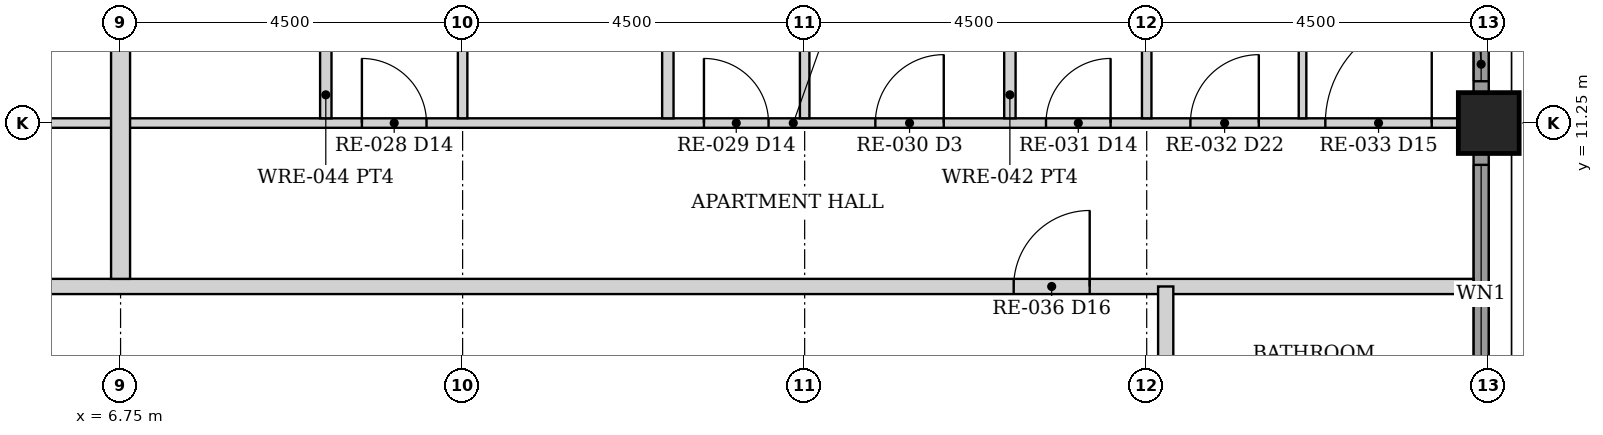
"""IFC4 building model, lengths in metres.
Left out: names, types, materials, properties, quantities, classifications, styles, units other than length and angle.
Written with IfcOpenShell. Run it as: python <this file> out.ifc"""

import sys

from ifc_helpers import new_model, si_unit, direction, frame, frame_2d, origin, origin_2d, place, context, subcontext, project, spatial, rectangle, hollow_rectangle, extrude, element, fill, save


model = new_model("IFC4")
c1 = context("Model", 3, precision=1e-05, world=origin(), true_north=direction((0.0, 1.0)))
c2 = subcontext(c1, "Body", "Model", "MODEL_VIEW")
j1 = project(units=[si_unit("LENGTHUNIT", "METRE"), si_unit("PLANEANGLEUNIT", "RADIAN")], contexts=[c1])
p1 = place(None, origin())
s1 = spatial("IfcSite", under=j1, at=p1, CompositionType="ELEMENT")
p2 = place(p1, origin())
s2 = spatial("IfcBuilding", under=s1, at=p2, CompositionType="ELEMENT")
p3 = place(p2, frame((0.0, 0.0, 68.5)))
s3 = spatial("IfcBuildingStorey", under=s2, at=p3, CompositionType="ELEMENT", Elevation=68.5)
p4 = place(p3, frame((24.75, 11.25, 0.0), z_axis=(0.0, 0.0, 1.0), x_axis=(1.0, 0.0, 0.0)))
e1 = element("IfcColumn", 1, at=p4, inside=s3, PredefinedType="COLUMN", context=c2, shape_type="SweptSolid", body=[
    extrude(hollow_rectangle(XDim=0.8, YDim=0.8, WallThickness=0.06, at=origin_2d()), origin(), (0.0, 0.0, 1.0), 3.5),
])
p5 = place(p3, frame((24.65, 7.155, 0.0), z_axis=(0.0, 0.0, 1.0), x_axis=(0.0, 1.0, 0.0)))
e2 = element("IfcWall", 2, at=p5, inside=s3, PredefinedType="SOLIDWALL", context=c2, shape_type="SweptSolid", body=[
    extrude(rectangle(XDim=3.69, YDim=0.2, at=frame_2d((1.845, 0.0))), origin(), (0.0, 0.0, 1.0), 2.379),
])
p6 = place(p5, frame((0.145, 0.0, 0.3)))
e3 = element("IfcOpeningElement", 3, at=p6, cuts=e2, PredefinedType="OPENING", context=c2, shape_type="SweptSolid", body=[
    extrude(rectangle(XDim=3.4, YDim=1.929, at=frame_2d((1.7, 0.964))), frame((0.0, 0.11, 0.0), z_axis=(0.0, -1.0, 0.0), x_axis=(1.0, 0.0, 0.0)), (0.0, 0.0, 1.0), 0.22),
])
p7 = place(p3, frame((24.65, 11.655, 0.0), z_axis=(0.0, 0.0, 1.0), x_axis=(0.0, 1.0, 0.0)))
e4 = element("IfcWall", 4, at=p7, inside=s3, PredefinedType="SOLIDWALL", context=c2, shape_type="SweptSolid", body=[
    extrude(rectangle(XDim=3.69, YDim=0.2, at=frame_2d((1.845, 0.0))), origin(), (0.0, 0.0, 1.0), 2.379),
])
p8 = place(p7, frame((0.145, 0.0, 0.3)))
e5 = element("IfcOpeningElement", 5, at=p8, cuts=e4, PredefinedType="OPENING", context=c2, shape_type="SweptSolid", body=[
    extrude(rectangle(XDim=3.4, YDim=1.929, at=frame_2d((1.7, 0.964))), frame((0.0, 0.11, 0.0), z_axis=(0.0, -1.0, 0.0), x_axis=(1.0, 0.0, 0.0)), (0.0, 0.0, 1.0), 0.22),
])
p9 = place(p3, frame((-24.55, 9.1, 0.0), z_axis=(0.0, 0.0, 1.0), x_axis=(1.0, 0.0, 0.0)))
e6 = element("IfcWall", 6, at=p9, inside=s3, PredefinedType="PARTITIONING", context=c2, shape_type="SweptSolid", body=[
    extrude(rectangle(XDim=49.1, YDim=0.2, at=frame_2d((24.55, 0.0))), origin(), (0.0, 0.0, 1.0), 2.373),
])
p10 = place(p9, frame((5.05, 0.0, 0.0)))
e7 = element("IfcOpeningElement", 7, at=p10, cuts=e6, PredefinedType="OPENING", context=c2, shape_type="SweptSolid", body=[
    extrude(rectangle(XDim=1.0, YDim=2.3, at=frame_2d((0.5, 1.15))), frame((0.0, 0.11, 0.0), z_axis=(0.0, -1.0, 0.0), x_axis=(1.0, 0.0, 0.0)), (0.0, 0.0, 1.0), 0.22),
])
p11 = place(p9, frame((18.05, 0.0, 0.0)))
e8 = element("IfcOpeningElement", 8, at=p11, cuts=e6, PredefinedType="OPENING", context=c2, shape_type="SweptSolid", body=[
    extrude(rectangle(XDim=1.0, YDim=2.3, at=frame_2d((0.5, 1.15))), frame((0.0, 0.11, 0.0), z_axis=(0.0, -1.0, 0.0), x_axis=(1.0, 0.0, 0.0)), (0.0, 0.0, 1.0), 0.22),
])
p12 = place(p9, frame((43.05, 0.0, 0.0)))
e9 = element("IfcOpeningElement", 9, at=p12, cuts=e6, PredefinedType="OPENING", context=c2, shape_type="SweptSolid", body=[
    extrude(rectangle(XDim=1.0, YDim=2.3, at=frame_2d((0.5, 1.15))), frame((0.0, 0.11, 0.0), z_axis=(0.0, -1.0, 0.0), x_axis=(1.0, 0.0, 0.0)), (0.0, 0.0, 1.0), 0.22),
])
p13 = place(p3, frame((20.5, -9.1, 0.0), z_axis=(0.0, 0.0, 1.0), x_axis=(0.0, 1.0, 0.0)))
e10 = element("IfcWall", 10, at=p13, inside=s3, PredefinedType="PARTITIONING", context=c2, shape_type="SweptSolid", body=[
    extrude(rectangle(XDim=18.2, YDim=0.2, at=frame_2d((9.1, 0.0))), origin(), (0.0, 0.0, 1.0), 2.373),
])
p14 = place(p13, frame((6.35, 0.0, 0.0)))
e11 = element("IfcOpeningElement", 11, at=p14, cuts=e10, PredefinedType="OPENING", context=c2, shape_type="SweptSolid", body=[
    extrude(rectangle(XDim=1.0, YDim=2.3, at=frame_2d((0.5, 1.15))), frame((0.0, 0.11, 0.0), z_axis=(0.0, -1.0, 0.0), x_axis=(1.0, 0.0, 0.0)), (0.0, 0.0, 1.0), 0.22),
])
p15 = place(p3, frame((-6.65, 11.25, 0.0), z_axis=(0.0, 0.0, 1.0), x_axis=(1.0, 0.0, 0.0)))
e12 = element("IfcWall", 12, at=p15, inside=s3, PredefinedType="PARTITIONING", context=c2, shape_type="SweptSolid", body=[
    extrude(rectangle(XDim=13.3, YDim=0.125, at=frame_2d((6.65, 0.0))), origin(), (0.0, 0.0, 1.0), 2.373),
])
p16 = place(p15, frame((0.7, 0.0, 0.0)))
e13 = element("IfcOpeningElement", 13, at=p16, cuts=e12, PredefinedType="OPENING", context=c2, shape_type="SweptSolid", body=[
    extrude(rectangle(XDim=0.9, YDim=2.1, at=frame_2d((0.45, 1.05))), frame((0.0, 0.073, 0.0), z_axis=(0.0, -1.0, 0.0), x_axis=(1.0, 0.0, 0.0)), (0.0, 0.0, 1.0), 0.145),
])
p17 = place(p15, frame((2.7, 0.0, 0.0)))
e14 = element("IfcOpeningElement", 14, at=p17, cuts=e12, PredefinedType="OPENING", context=c2, shape_type="SweptSolid", body=[
    extrude(rectangle(XDim=1.4, YDim=2.1, at=frame_2d((0.7, 1.05))), frame((0.0, 0.073, 0.0), z_axis=(0.0, -1.0, 0.0), x_axis=(1.0, 0.0, 0.0)), (0.0, 0.0, 1.0), 0.145),
])
p18 = place(p15, frame((4.875, 0.0, 0.0)))
e15 = element("IfcOpeningElement", 15, at=p18, cuts=e12, PredefinedType="OPENING", context=c2, shape_type="SweptSolid", body=[
    extrude(rectangle(XDim=0.85, YDim=2.1, at=frame_2d((0.425, 1.05))), frame((0.0, 0.073, 0.0), z_axis=(0.0, -1.0, 0.0), x_axis=(1.0, 0.0, 0.0)), (0.0, 0.0, 1.0), 0.145),
])
p19 = place(p15, frame((7.07, 0.0, 0.0)))
e16 = element("IfcOpeningElement", 16, at=p19, cuts=e12, PredefinedType="OPENING", context=c2, shape_type="SweptSolid", body=[
    extrude(rectangle(XDim=0.9, YDim=2.1, at=frame_2d((0.45, 1.05))), frame((0.0, 0.073, 0.0), z_axis=(0.0, -1.0, 0.0), x_axis=(1.0, 0.0, 0.0)), (0.0, 0.0, 1.0), 0.145),
])
p20 = place(p15, frame((9.375, 0.0, 0.0)))
e17 = element("IfcOpeningElement", 17, at=p20, cuts=e12, PredefinedType="OPENING", context=c2, shape_type="SweptSolid", body=[
    extrude(rectangle(XDim=0.85, YDim=2.1, at=frame_2d((0.425, 1.05))), frame((0.0, 0.073, 0.0), z_axis=(0.0, -1.0, 0.0), x_axis=(1.0, 0.0, 0.0)), (0.0, 0.0, 1.0), 0.145),
])
p21 = place(p3, frame((6.85, 11.25, 0.0), z_axis=(0.0, 0.0, 1.0), x_axis=(1.0, 0.0, 0.0)))
e18 = element("IfcWall", 18, at=p21, inside=s3, PredefinedType="PARTITIONING", context=c2, shape_type="SweptSolid", body=[
    extrude(rectangle(XDim=17.5, YDim=0.125, at=frame_2d((8.75, 0.0))), origin(), (0.0, 0.0, 1.0), 2.373),
])
p22 = place(p21, frame((13.975, 0.0, 0.0)))
e19 = element("IfcOpeningElement", 19, at=p22, cuts=e18, PredefinedType="OPENING", context=c2, shape_type="SweptSolid", body=[
    extrude(rectangle(XDim=0.9, YDim=2.1, at=frame_2d((0.45, 1.05))), frame((0.0, 0.073, 0.0), z_axis=(0.0, -1.0, 0.0), x_axis=(1.0, 0.0, 0.0)), (0.0, 0.0, 1.0), 0.145),
])
p23 = place(p21, frame((15.75, 0.0, 0.0)))
e20 = element("IfcOpeningElement", 20, at=p23, cuts=e18, PredefinedType="OPENING", context=c2, shape_type="SweptSolid", body=[
    extrude(rectangle(XDim=1.4, YDim=2.1, at=frame_2d((0.7, 1.05))), frame((0.0, 0.073, 0.0), z_axis=(0.0, -1.0, 0.0), x_axis=(1.0, 0.0, 0.0)), (0.0, 0.0, 1.0), 0.145),
])
p24 = place(p21, frame((12.075, 0.0, 0.0)))
e21 = element("IfcOpeningElement", 21, at=p24, cuts=e18, PredefinedType="OPENING", context=c2, shape_type="SweptSolid", body=[
    extrude(rectangle(XDim=0.85, YDim=2.1, at=frame_2d((0.425, 1.05))), frame((0.0, 0.073, 0.0), z_axis=(0.0, -1.0, 0.0), x_axis=(1.0, 0.0, 0.0)), (0.0, 0.0, 1.0), 0.145),
])
p25 = place(p21, frame((9.83, 0.0, 0.0)))
e22 = element("IfcOpeningElement", 22, at=p25, cuts=e18, PredefinedType="OPENING", context=c2, shape_type="SweptSolid", body=[
    extrude(rectangle(XDim=0.9, YDim=2.1, at=frame_2d((0.45, 1.05))), frame((0.0, 0.073, 0.0), z_axis=(0.0, -1.0, 0.0), x_axis=(1.0, 0.0, 0.0)), (0.0, 0.0, 1.0), 0.145),
])
p26 = place(p21, frame((7.575, 0.0, 0.0)))
e23 = element("IfcOpeningElement", 23, at=p26, cuts=e18, PredefinedType="OPENING", context=c2, shape_type="SweptSolid", body=[
    extrude(rectangle(XDim=0.85, YDim=2.1, at=frame_2d((0.425, 1.05))), frame((0.0, 0.073, 0.0), z_axis=(0.0, -1.0, 0.0), x_axis=(1.0, 0.0, 0.0)), (0.0, 0.0, 1.0), 0.145),
])
p27 = place(p21, frame((3.075, 0.0, 0.0)))
e24 = element("IfcOpeningElement", 24, at=p27, cuts=e18, PredefinedType="OPENING", context=c2, shape_type="SweptSolid", body=[
    extrude(rectangle(XDim=0.85, YDim=2.1, at=frame_2d((0.425, 1.05))), frame((0.0, 0.073, 0.0), z_axis=(0.0, -1.0, 0.0), x_axis=(1.0, 0.0, 0.0)), (0.0, 0.0, 1.0), 0.145),
])
p28 = place(p3, frame((22.3, 11.312, 0.0), z_axis=(0.0, 0.0, 1.0), x_axis=(0.0, 1.0, 0.0)))
e25 = element("IfcWall", 25, at=p28, inside=s3, PredefinedType="PARTITIONING", context=c2, shape_type="SweptSolid", body=[
    extrude(rectangle(XDim=5.25, YDim=0.1, at=frame_2d((2.625, 0.0))), origin(), (0.0, 0.0, 1.0), 2.373),
])
p29 = place(p3, frame((20.25, 11.312, 0.0), z_axis=(0.0, 0.0, 1.0), x_axis=(0.0, 1.0, 0.0)))
e26 = element("IfcWall", 26, at=p29, inside=s3, PredefinedType="PARTITIONING", context=c2, shape_type="SweptSolid", body=[
    extrude(rectangle(XDim=13.038, YDim=0.125, at=frame_2d((6.519, 0.0))), origin(), (0.0, 0.0, 1.0), 2.373),
])
p30 = place(p3, frame((18.45, 11.312, 0.0), z_axis=(0.0, 0.0, 1.0), x_axis=(0.0, 1.0, 0.0)))
e27 = element("IfcWall", 27, at=p30, inside=s3, PredefinedType="PARTITIONING", context=c2, shape_type="SweptSolid", body=[
    extrude(rectangle(XDim=3.087, YDim=0.15, at=frame_2d((1.544, 0.0))), origin(), (0.0, 0.0, 1.0), 2.373),
])
p31 = place(p30, frame((1.087, 0.0, 0.0)))
e28 = element("IfcOpeningElement", 28, at=p31, cuts=e27, PredefinedType="OPENING", context=c2, shape_type="SweptSolid", body=[
    extrude(rectangle(XDim=0.8, YDim=2.1, at=frame_2d((0.4, 1.05))), frame((0.0, 0.085, 0.0), z_axis=(0.0, -1.0, 0.0), x_axis=(1.0, 0.0, 0.0)), (0.0, 0.0, 1.0), 0.17),
])
p32 = place(p3, frame((15.75, 11.312, 0.0), z_axis=(0.0, 0.0, 1.0), x_axis=(0.0, 1.0, 0.0)))
e29 = element("IfcWall", 29, at=p32, inside=s3, PredefinedType="PARTITIONING", context=c2, shape_type="SweptSolid", body=[
    extrude(rectangle(XDim=13.038, YDim=0.125, at=frame_2d((6.519, 0.0))), origin(), (0.0, 0.0, 1.0), 2.373),
])
p33 = place(p3, frame((13.95, 11.312, 0.0), z_axis=(0.0, 0.0, 1.0), x_axis=(0.0, 1.0, 0.0)))
e30 = element("IfcWall", 30, at=p33, inside=s3, PredefinedType="PARTITIONING", context=c2, shape_type="SweptSolid", body=[
    extrude(rectangle(XDim=3.087, YDim=0.15, at=frame_2d((1.544, 0.0))), origin(), (0.0, 0.0, 1.0), 2.373),
])
p34 = place(p33, frame((1.087, 0.0, 0.0)))
e31 = element("IfcOpeningElement", 31, at=p34, cuts=e30, PredefinedType="OPENING", context=c2, shape_type="SweptSolid", body=[
    extrude(rectangle(XDim=0.8, YDim=2.1, at=frame_2d((0.4, 1.05))), frame((0.0, 0.085, 0.0), z_axis=(0.0, -1.0, 0.0), x_axis=(1.0, 0.0, 0.0)), (0.0, 0.0, 1.0), 0.17),
])
p35 = place(p3, frame((11.25, 11.312, 0.0), z_axis=(0.0, 0.0, 1.0), x_axis=(0.0, 1.0, 0.0)))
e32 = element("IfcWall", 32, at=p35, inside=s3, PredefinedType="PARTITIONING", context=c2, shape_type="SweptSolid", body=[
    extrude(rectangle(XDim=13.038, YDim=0.125, at=frame_2d((6.519, 0.0))), origin(), (0.0, 0.0, 1.0), 2.373),
])
p36 = place(p3, frame((9.45, 11.312, 0.0), z_axis=(0.0, 0.0, 1.0), x_axis=(0.0, 1.0, 0.0)))
e33 = element("IfcWall", 33, at=p36, inside=s3, PredefinedType="PARTITIONING", context=c2, shape_type="SweptSolid", body=[
    extrude(rectangle(XDim=3.087, YDim=0.15, at=frame_2d((1.544, 0.0))), origin(), (0.0, 0.0, 1.0), 2.373),
])
p37 = place(p36, frame((1.087, 0.0, 0.0)))
e34 = element("IfcOpeningElement", 34, at=p37, cuts=e33, PredefinedType="OPENING", context=c2, shape_type="SweptSolid", body=[
    extrude(rectangle(XDim=0.8, YDim=2.1, at=frame_2d((0.4, 1.05))), frame((0.0, 0.085, 0.0), z_axis=(0.0, -1.0, 0.0), x_axis=(1.0, 0.0, 0.0)), (0.0, 0.0, 1.0), 0.17),
])
p38 = place(p3, frame((6.75, 9.2, 0.0), z_axis=(0.0, 0.0, 1.0), x_axis=(0.0, 1.0, 0.0)))
e35 = element("IfcWall", 35, at=p38, inside=s3, PredefinedType="PARTITIONING", context=c2, shape_type="SweptSolid", body=[
    extrude(rectangle(XDim=15.15, YDim=0.25, at=frame_2d((7.575, 0.0))), origin(), (0.0, 0.0, 1.0), 2.373),
])
p39 = place(p6, origin())
e36 = element("IfcWindow", 36, at=p39, inside=s3, PartitioningType="SINGLE_PANEL", PredefinedType="WINDOW", context=c2, shape_type="SweptSolid", body=[
    extrude(rectangle(XDim=3.4, YDim=1.929, at=frame_2d((1.7, 0.964))), frame((0.0, 0.03, 0.0), z_axis=(0.0, -1.0, 0.0), x_axis=(1.0, 0.0, 0.0)), (0.0, 0.0, 1.0), 0.06),
])
fill(e3, e36)
p40 = place(p8, origin())
e37 = element("IfcWindow", 37, at=p40, inside=s3, PartitioningType="SINGLE_PANEL", PredefinedType="WINDOW", context=c2, shape_type="SweptSolid", body=[
    extrude(rectangle(XDim=3.4, YDim=1.929, at=frame_2d((1.7, 0.964))), frame((0.0, 0.03, 0.0), z_axis=(0.0, -1.0, 0.0), x_axis=(1.0, 0.0, 0.0)), (0.0, 0.0, 1.0), 0.06),
])
fill(e5, e37)
p41 = place(p12, origin())
e38 = element("IfcDoor", 38, at=p41, inside=s3, OperationType="SINGLE_SWING_RIGHT", PredefinedType="DOOR", context=c2, shape_type="SweptSolid", body=[
    extrude(rectangle(XDim=1.0, YDim=2.3, at=frame_2d((0.5, 1.15))), frame((0.0, 0.025, 0.0), z_axis=(0.0, -1.0, 0.0), x_axis=(1.0, 0.0, 0.0)), (0.0, 0.0, 1.0), 0.05),
])
fill(e9, e38)
p42 = place(p22, origin())
e39 = element("IfcDoor", 39, at=p42, inside=s3, OperationType="SINGLE_SWING_RIGHT", PredefinedType="DOOR", context=c2, shape_type="SweptSolid", body=[
    extrude(rectangle(XDim=0.9, YDim=2.1, at=frame_2d((0.45, 1.05))), frame((0.0, 0.025, 0.0), z_axis=(0.0, -1.0, 0.0), x_axis=(1.0, 0.0, 0.0)), (0.0, 0.0, 1.0), 0.05),
])
fill(e19, e39)
p43 = place(p23, origin())
e40 = element("IfcDoor", 40, at=p43, inside=s3, OperationType="SINGLE_SWING_RIGHT", PredefinedType="DOOR", context=c2, shape_type="SweptSolid", body=[
    extrude(rectangle(XDim=1.4, YDim=2.1, at=frame_2d((0.7, 1.05))), frame((0.0, 0.025, 0.0), z_axis=(0.0, -1.0, 0.0), x_axis=(1.0, 0.0, 0.0)), (0.0, 0.0, 1.0), 0.05),
])
fill(e20, e40)
p44 = place(p24, origin())
e41 = element("IfcDoor", 41, at=p44, inside=s3, OperationType="SINGLE_SWING_RIGHT", PredefinedType="DOOR", context=c2, shape_type="SweptSolid", body=[
    extrude(rectangle(XDim=0.85, YDim=2.1, at=frame_2d((0.425, 1.05))), frame((0.0, 0.025, 0.0), z_axis=(0.0, -1.0, 0.0), x_axis=(1.0, 0.0, 0.0)), (0.0, 0.0, 1.0), 0.05),
])
fill(e21, e41)
p45 = place(p25, origin())
e42 = element("IfcDoor", 42, at=p45, inside=s3, OperationType="SINGLE_SWING_RIGHT", PredefinedType="DOOR", context=c2, shape_type="SweptSolid", body=[
    extrude(rectangle(XDim=0.9, YDim=2.1, at=frame_2d((0.45, 1.05))), frame((0.0, 0.025, 0.0), z_axis=(0.0, -1.0, 0.0), x_axis=(1.0, 0.0, 0.0)), (0.0, 0.0, 1.0), 0.05),
])
fill(e22, e42)
p46 = place(p26, origin())
e43 = element("IfcDoor", 43, at=p46, inside=s3, OperationType="SINGLE_SWING_LEFT", PredefinedType="DOOR", context=c2, shape_type="SweptSolid", body=[
    extrude(rectangle(XDim=0.85, YDim=2.1, at=frame_2d((0.425, 1.05))), frame((0.0, 0.025, 0.0), z_axis=(0.0, -1.0, 0.0), x_axis=(1.0, 0.0, 0.0)), (0.0, 0.0, 1.0), 0.05),
])
fill(e23, e43)
p47 = place(p27, origin())
e44 = element("IfcDoor", 44, at=p47, inside=s3, OperationType="SINGLE_SWING_LEFT", PredefinedType="DOOR", context=c2, shape_type="SweptSolid", body=[
    extrude(rectangle(XDim=0.85, YDim=2.1, at=frame_2d((0.425, 1.05))), frame((0.0, 0.025, 0.0), z_axis=(0.0, -1.0, 0.0), x_axis=(1.0, 0.0, 0.0)), (0.0, 0.0, 1.0), 0.05),
])
fill(e24, e44)
save(model, sys.argv[1])
